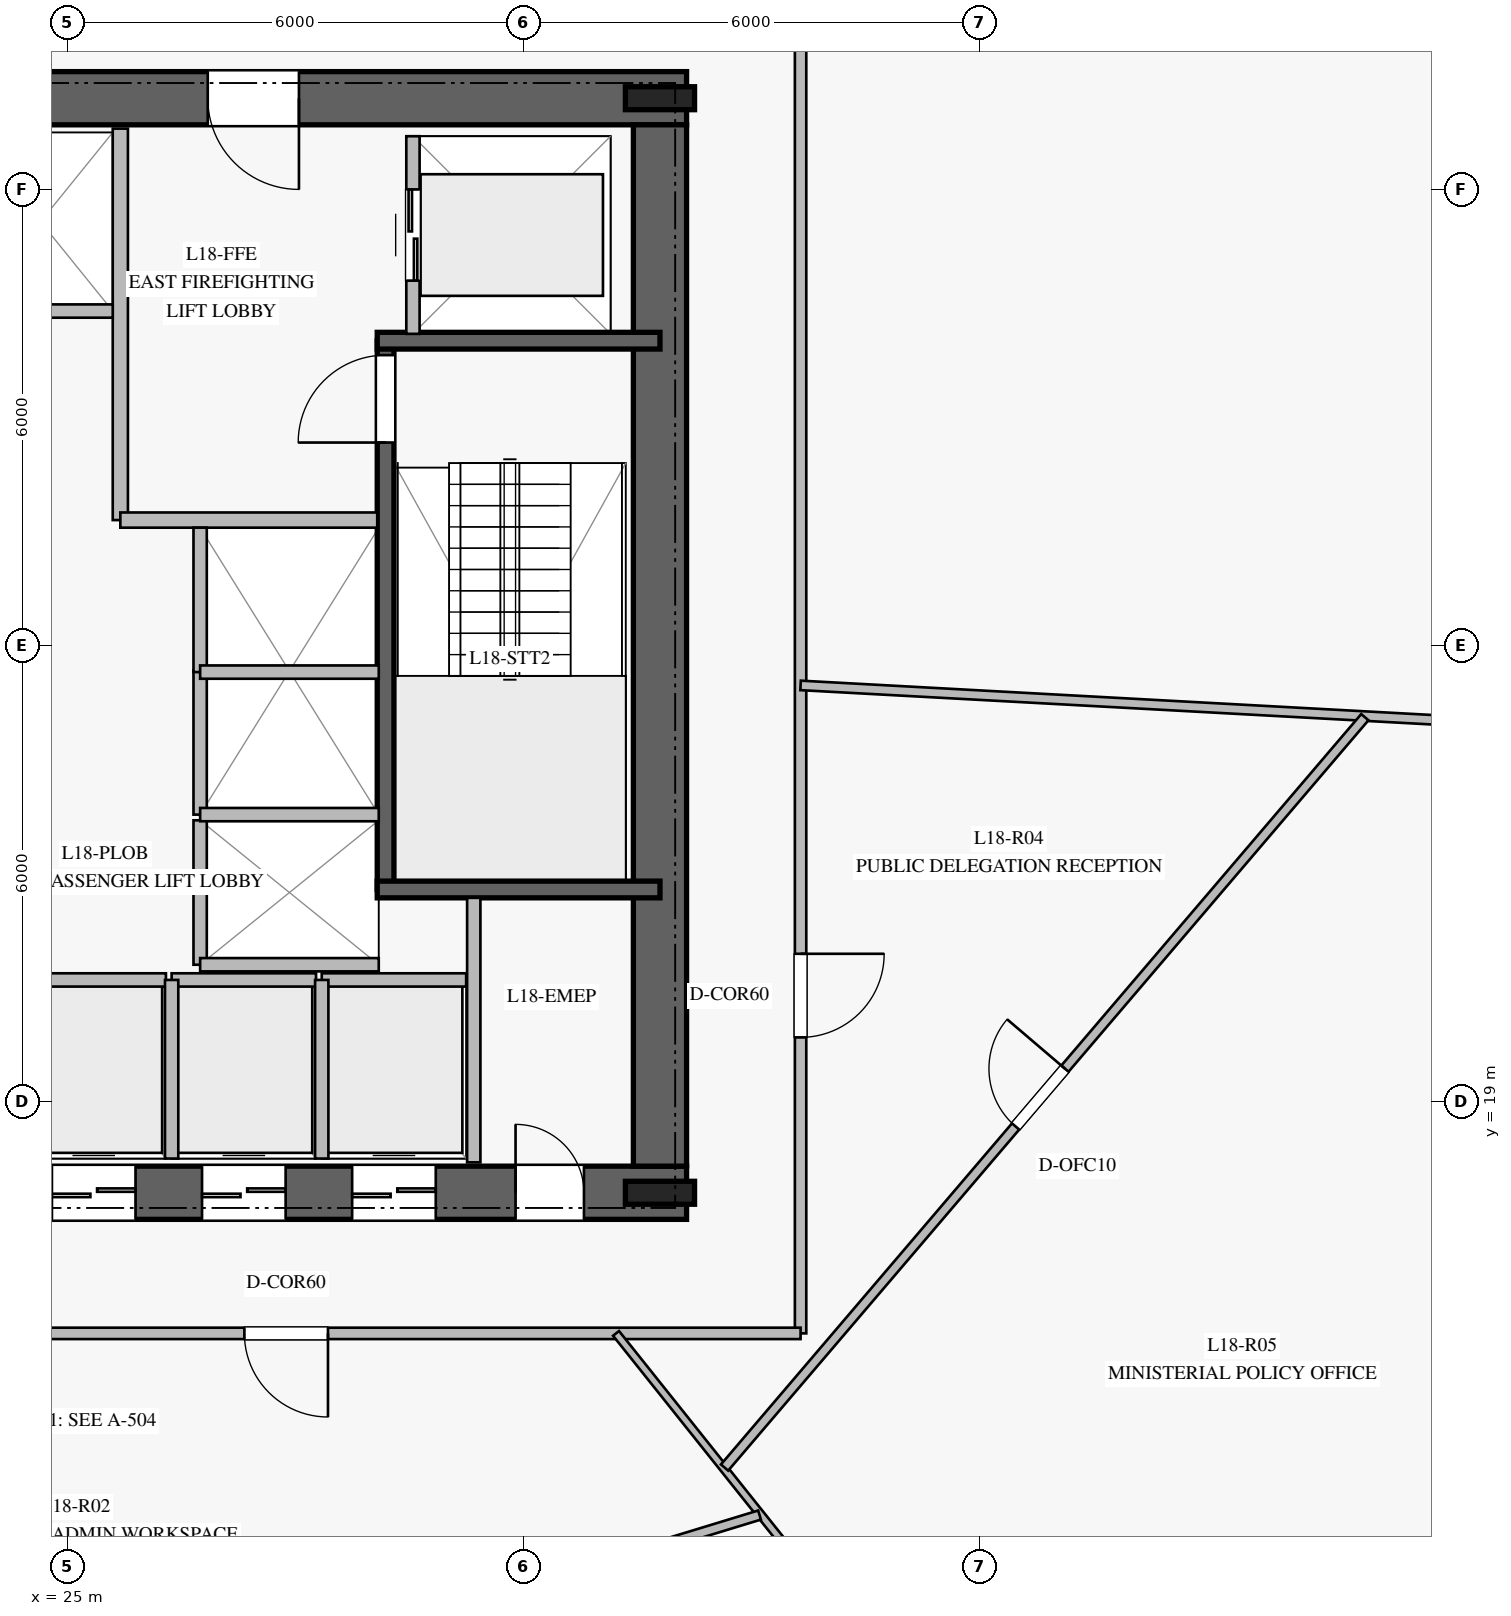
"""IFC4 building model, lengths in metres.
Left out: names, types, materials, properties, quantities, classifications, styles, units other than length and angle.
Written with IfcOpenShell. Run it as: python <this file> out.ifc"""

import sys

from ifc_helpers import new_model, si_unit, direction, frame, frame_2d, origin, origin_2d, place, context, subcontext, project, spatial, rectangle, i_section, extrude, element, fill, save


model = new_model("IFC4")
c1 = context("Model", 3, precision=1e-05, world=origin(), true_north=direction((0.0, 1.0)))
c2 = subcontext(c1, "Body", "Model", "MODEL_VIEW")
j1 = project(units=[si_unit("LENGTHUNIT", "METRE"), si_unit("PLANEANGLEUNIT", "RADIAN")], contexts=[c1])
p1 = place(None, origin())
s1 = spatial("IfcSite", under=j1, at=p1, CompositionType="ELEMENT")
p2 = place(p1, origin())
s2 = spatial("IfcBuilding", under=s1, at=p2, CompositionType="ELEMENT")
p3 = place(p2, frame((0.0, 0.0, 76.0)))
s3 = spatial("IfcBuildingStorey", under=s2, at=p3, CompositionType="ELEMENT", Elevation=76.0)
p4 = place(p3, frame((16.85, 17.8, 0.0), z_axis=(0.0, 0.0, 1.0), x_axis=(1.0, 0.0, 0.0)))
e1 = element("IfcWall", 1, at=p4, inside=s3, PredefinedType="SHEAR", context=c2, shape_type="SweptSolid", body=[
    extrude(rectangle(XDim=16.3, YDim=0.7, at=frame_2d((8.15, 0.0))), origin(), (0.0, 0.0, 1.0), 3.76),
])
p5 = place(p4, frame((5.1, 0.0, 0.0)))
e2 = element("IfcOpeningElement", 2, at=p5, cuts=e1, PredefinedType="OPENING", context=c2, shape_type="SweptSolid", body=[
    extrude(rectangle(XDim=1.2, YDim=2.25, at=frame_2d((0.6, 1.125))), frame((0.0, 0.36, 0.0), z_axis=(0.0, -1.0, 0.0), x_axis=(1.0, 0.0, 0.0)), (0.0, 0.0, 1.0), 0.72),
])
p6 = place(p4, frame((14.05, 0.0, 0.0)))
e3 = element("IfcOpeningElement", 3, at=p6, cuts=e1, PredefinedType="OPENING", context=c2, shape_type="SweptSolid", body=[
    extrude(rectangle(XDim=0.9, YDim=2.1, at=frame_2d((0.45, 1.05))), frame((0.0, 0.36, 0.0), z_axis=(0.0, -1.0, 0.0), x_axis=(1.0, 0.0, 0.0)), (0.0, 0.0, 1.0), 0.72),
])
p7 = place(p4, frame((7.95, 0.0, 0.0)))
e4 = element("IfcOpeningElement", 4, at=p7, cuts=e1, PredefinedType="OPENING", context=c2, shape_type="SweptSolid", body=[
    extrude(rectangle(XDim=1.1, YDim=2.2, at=frame_2d((0.55, 1.1))), frame((0.0, 0.36, 0.0), z_axis=(0.0, -1.0, 0.0), x_axis=(1.0, 0.0, 0.0)), (0.0, 0.0, 1.0), 0.72),
])
p8 = place(p4, frame((9.925, 0.0, 0.0)))
e5 = element("IfcOpeningElement", 5, at=p8, cuts=e1, PredefinedType="OPENING", context=c2, shape_type="SweptSolid", body=[
    extrude(rectangle(XDim=1.1, YDim=2.2, at=frame_2d((0.55, 1.1))), frame((0.0, 0.36, 0.0), z_axis=(0.0, -1.0, 0.0), x_axis=(1.0, 0.0, 0.0)), (0.0, 0.0, 1.0), 0.72),
])
p9 = place(p4, frame((11.9, 0.0, 0.0)))
e6 = element("IfcOpeningElement", 6, at=p9, cuts=e1, PredefinedType="OPENING", context=c2, shape_type="SweptSolid", body=[
    extrude(rectangle(XDim=1.1, YDim=2.2, at=frame_2d((0.55, 1.1))), frame((0.0, 0.36, 0.0), z_axis=(0.0, -1.0, 0.0), x_axis=(1.0, 0.0, 0.0)), (0.0, 0.0, 1.0), 0.72),
])
p10 = place(p3, frame((33.15, 32.2, 0.0), z_axis=(0.0, 0.0, 1.0), x_axis=(-1.0, 0.0, 0.0)))
e7 = element("IfcWall", 7, at=p10, inside=s3, PredefinedType="SHEAR", context=c2, shape_type="SweptSolid", body=[
    extrude(rectangle(XDim=16.3, YDim=0.7, at=frame_2d((8.15, 0.0))), origin(), (0.0, 0.0, 1.0), 3.76),
])
p11 = place(p10, frame((5.1, 0.0, 0.0)))
e8 = element("IfcOpeningElement", 8, at=p11, cuts=e7, PredefinedType="OPENING", context=c2, shape_type="SweptSolid", body=[
    extrude(rectangle(XDim=1.2, YDim=2.25, at=frame_2d((0.6, 1.125))), frame((0.0, 0.36, 0.0), z_axis=(0.0, -1.0, 0.0), x_axis=(1.0, 0.0, 0.0)), (0.0, 0.0, 1.0), 0.72),
])
p12 = place(p3, frame((32.8, 18.15, 0.0), z_axis=(0.0, 0.0, 1.0), x_axis=(0.0, 1.0, 0.0)))
e9 = element("IfcWall", 9, at=p12, inside=s3, PredefinedType="SHEAR", context=c2, shape_type="SweptSolid", body=[
    extrude(rectangle(XDim=13.7, YDim=0.7, at=frame_2d((6.85, 0.0))), origin(), (0.0, 0.0, 1.0), 3.76),
])
for number, where, z_axis, x_axis in (
    (10, (32.8, 17.8, 0.0), (0.0, 0.0, 1.0), (1.0, 0.0, 0.0)),
    (11, (32.8, 32.2, 0.0), (0.0, 0.0, 1.0), (1.0, 0.0, 0.0)),
):
    element("IfcColumn", number, at=place(p3, frame(where, z_axis=z_axis, x_axis=x_axis)), inside=s3, PredefinedType="COLUMN", context=c2, shape_type="SweptSolid", body=[
        extrude(i_section(OverallWidth=0.302, OverallDepth=0.91, WebThickness=0.021, FlangeThickness=0.04, at=origin_2d()), origin(), (0.0, 0.0, 1.0), 4.0),
    ])
p13 = place(p3, frame((29.19, 21.79, 0.0), z_axis=(0.0, 0.0, 1.0), x_axis=(0.0, 1.0, 0.0)))
e12 = element("IfcWall", 12, at=p13, inside=s3, PredefinedType="SOLIDWALL", context=c2, shape_type="SweptSolid", body=[
    extrude(rectangle(XDim=7.22, YDim=0.22, at=frame_2d((3.61, 0.0))), origin(), (0.0, 0.0, 1.0), 3.76),
])
p14 = place(p13, frame((5.88, 0.0, 0.0)))
e13 = element("IfcOpeningElement", 13, at=p14, cuts=e12, PredefinedType="OPENING", context=c2, shape_type="SweptSolid", body=[
    extrude(rectangle(XDim=1.15, YDim=2.2, at=frame_2d((0.575, 1.1))), frame((0.0, 0.12, 0.0), z_axis=(0.0, -1.0, 0.0), x_axis=(1.0, 0.0, 0.0)), (0.0, 0.0, 1.0), 0.24),
])
for number, where, z_axis, x_axis in (
    (14, (29.08, 21.79, 0.0), (0.0, 0.0, 1.0), (1.0, 0.0, 0.0)),
    (15, (29.08, 29.01, 0.0), (0.0, 0.0, 1.0), (1.0, 0.0, 0.0)),
):
    element("IfcWall", number, at=place(p3, frame(where, z_axis=z_axis, x_axis=x_axis)), inside=s3, PredefinedType="SOLIDWALL", context=c2, shape_type="SweptSolid", body=[
        extrude(rectangle(XDim=3.72, YDim=0.22, at=frame_2d((1.86, 0.0))), origin(), (0.0, 0.0, 1.0), 3.76),
    ])
p15 = place(p3, frame((25.7, 26.65, 0.0), z_axis=(0.0, 0.0, 1.0), x_axis=(0.0, 1.0, 0.0)))
e16 = element("IfcWall", 16, at=p15, inside=s3, PredefinedType="PARTITIONING", context=c2, shape_type="SweptSolid", body=[
    extrude(rectangle(XDim=5.15, YDim=0.2, at=frame_2d((2.575, 0.0))), origin(), (0.0, 0.0, 1.0), 3.76),
])
p16 = place(p3, frame((25.7, 26.65, 0.0), z_axis=(0.0, 0.0, 1.0), x_axis=(1.0, 0.0, 0.0)))
e17 = element("IfcWall", 17, at=p16, inside=s3, PredefinedType="PARTITIONING", context=c2, shape_type="SweptSolid", body=[
    extrude(rectangle(XDim=3.38, YDim=0.2, at=frame_2d((1.69, 0.0))), origin(), (0.0, 0.0, 1.0), 3.76),
])
p17 = place(p3, frame((30.35, 18.2, 0.0), z_axis=(0.0, 0.0, 1.0), x_axis=(0.0, 1.0, 0.0)))
e18 = element("IfcWall", 18, at=p17, inside=s3, PredefinedType="PARTITIONING", context=c2, shape_type="SweptSolid", body=[
    extrude(rectangle(XDim=3.48, YDim=0.175, at=frame_2d((1.74, 0.0))), origin(), (0.0, 0.0, 1.0), 3.76),
])
p18 = place(p3, frame((24.4, 20.6, 0.0), z_axis=(0.0, 0.0, 1.0), x_axis=(1.0, 0.0, 0.0)))
e19 = element("IfcWall", 19, at=p18, inside=s3, PredefinedType="PARTITIONING", context=c2, shape_type="SweptSolid", body=[
    extrude(rectangle(XDim=1.9, YDim=0.175, at=frame_2d((0.95, 0.0))), origin(), (0.0, 0.0, 1.0), 3.76),
])
p19 = place(p3, frame((26.375, 20.6, 0.0), z_axis=(0.0, 0.0, 1.0), x_axis=(1.0, 0.0, 0.0)))
e20 = element("IfcWall", 20, at=p19, inside=s3, PredefinedType="PARTITIONING", context=c2, shape_type="SweptSolid", body=[
    extrude(rectangle(XDim=1.9, YDim=0.175, at=frame_2d((0.95, 0.0))), origin(), (0.0, 0.0, 1.0), 3.76),
])
p20 = place(p3, frame((26.375, 18.25, 0.0), z_axis=(0.0, 0.0, 1.0), x_axis=(0.0, 1.0, 0.0)))
e21 = element("IfcWall", 21, at=p20, inside=s3, PredefinedType="PARTITIONING", context=c2, shape_type="SweptSolid", body=[
    extrude(rectangle(XDim=2.35, YDim=0.175, at=frame_2d((1.175, 0.0))), origin(), (0.0, 0.0, 1.0), 3.76),
])
p21 = place(p3, frame((28.35, 20.6, 0.0), z_axis=(0.0, 0.0, 1.0), x_axis=(1.0, 0.0, 0.0)))
e22 = element("IfcWall", 22, at=p21, inside=s3, PredefinedType="PARTITIONING", context=c2, shape_type="SweptSolid", body=[
    extrude(rectangle(XDim=1.9, YDim=0.175, at=frame_2d((0.95, 0.0))), origin(), (0.0, 0.0, 1.0), 3.76),
])
p22 = place(p3, frame((28.35, 18.25, 0.0), z_axis=(0.0, 0.0, 1.0), x_axis=(0.0, 1.0, 0.0)))
e23 = element("IfcWall", 23, at=p22, inside=s3, PredefinedType="PARTITIONING", context=c2, shape_type="SweptSolid", body=[
    extrude(rectangle(XDim=2.35, YDim=0.175, at=frame_2d((1.175, 0.0))), origin(), (0.0, 0.0, 1.0), 3.76),
])
p23 = place(p3, frame((23.7, 29.4, 0.0), z_axis=(0.0, 0.0, 1.0), x_axis=(1.0, 0.0, 0.0)))
e24 = element("IfcWall", 24, at=p23, inside=s3, PredefinedType="PARTITIONING", context=c2, shape_type="SweptSolid", body=[
    extrude(rectangle(XDim=1.9, YDim=0.175, at=frame_2d((0.95, 0.0))), origin(), (0.0, 0.0, 1.0), 3.76),
])
p24 = place(p3, frame((26.75, 20.8, 0.0), z_axis=(0.0, 0.0, 1.0), x_axis=(0.0, 1.0, 0.0)))
e25 = element("IfcWall", 25, at=p24, inside=s3, PredefinedType="PARTITIONING", context=c2, shape_type="SweptSolid", body=[
    extrude(rectangle(XDim=1.9, YDim=0.175, at=frame_2d((0.95, 0.0))), origin(), (0.0, 0.0, 1.0), 3.76),
])
p25 = place(p3, frame((26.75, 20.8, 0.0), z_axis=(0.0, 0.0, 1.0), x_axis=(1.0, 0.0, 0.0)))
e26 = element("IfcWall", 26, at=p25, inside=s3, PredefinedType="PARTITIONING", context=c2, shape_type="SweptSolid", body=[
    extrude(rectangle(XDim=2.35, YDim=0.175, at=frame_2d((1.175, 0.0))), origin(), (0.0, 0.0, 1.0), 3.76),
])
p26 = place(p3, frame((26.75, 22.775, 0.0), z_axis=(0.0, 0.0, 1.0), x_axis=(0.0, 1.0, 0.0)))
e27 = element("IfcWall", 27, at=p26, inside=s3, PredefinedType="PARTITIONING", context=c2, shape_type="SweptSolid", body=[
    extrude(rectangle(XDim=1.9, YDim=0.175, at=frame_2d((0.95, 0.0))), origin(), (0.0, 0.0, 1.0), 3.76),
])
p27 = place(p3, frame((26.75, 22.775, 0.0), z_axis=(0.0, 0.0, 1.0), x_axis=(1.0, 0.0, 0.0)))
e28 = element("IfcWall", 28, at=p27, inside=s3, PredefinedType="PARTITIONING", context=c2, shape_type="SweptSolid", body=[
    extrude(rectangle(XDim=2.35, YDim=0.175, at=frame_2d((1.175, 0.0))), origin(), (0.0, 0.0, 1.0), 3.76),
])
p28 = place(p3, frame((26.75, 24.65, 0.0), z_axis=(0.0, 0.0, 1.0), x_axis=(0.0, 1.0, 0.0)))
e29 = element("IfcWall", 29, at=p28, inside=s3, PredefinedType="PARTITIONING", context=c2, shape_type="SweptSolid", body=[
    extrude(rectangle(XDim=1.9, YDim=0.175, at=frame_2d((0.95, 0.0))), origin(), (0.0, 0.0, 1.0), 3.76),
])
p29 = place(p3, frame((26.75, 24.65, 0.0), z_axis=(0.0, 0.0, 1.0), x_axis=(1.0, 0.0, 0.0)))
e30 = element("IfcWall", 30, at=p29, inside=s3, PredefinedType="PARTITIONING", context=c2, shape_type="SweptSolid", body=[
    extrude(rectangle(XDim=2.35, YDim=0.175, at=frame_2d((1.175, 0.0))), origin(), (0.0, 0.0, 1.0), 3.76),
])
p30 = place(p3, frame((29.55, 29.1, 0.0), z_axis=(0.0, 0.0, 1.0), x_axis=(0.0, 1.0, 0.0)))
e31 = element("IfcWall", 31, at=p30, inside=s3, PredefinedType="PARTITIONING", context=c2, shape_type="SweptSolid", body=[
    extrude(rectangle(XDim=2.6, YDim=0.175, at=frame_2d((1.3, 0.0))), origin(), (0.0, 0.0, 1.0), 3.76),
])
p31 = place(p30, frame((0.7, 0.0, 0.0)))
e32 = element("IfcOpeningElement", 32, at=p31, cuts=e31, PredefinedType="OPENING", context=c2, shape_type="SweptSolid", body=[
    extrude(rectangle(XDim=1.2, YDim=2.2, at=frame_2d((0.6, 1.1))), frame((0.0, 0.098, 0.0), z_axis=(0.0, -1.0, 0.0), x_axis=(1.0, 0.0, 0.0)), (0.0, 0.0, 1.0), 0.195),
])
p32 = place(p3, frame((34.65, 34.05, 0.0), z_axis=(0.0, 0.0, 1.0), x_axis=(0.0, -1.0, 0.0)))
e33 = element("IfcWall", 33, at=p32, inside=s3, PredefinedType="PARTITIONING", context=c2, shape_type="SweptSolid", body=[
    extrude(rectangle(XDim=18.1, YDim=0.15, at=frame_2d((9.05, 0.0))), origin(), (0.0, 0.0, 1.0), 3.21),
])
p33 = place(p32, frame((13.106, 0.0, 0.0)))
e34 = element("IfcOpeningElement", 34, at=p33, cuts=e33, PredefinedType="OPENING", context=c2, shape_type="SweptSolid", body=[
    extrude(rectangle(XDim=1.1, YDim=2.2, at=frame_2d((0.55, 1.1))), frame((0.0, 0.085, 0.0), z_axis=(0.0, -1.0, 0.0), x_axis=(1.0, 0.0, 0.0)), (0.0, 0.0, 1.0), 0.17),
])
p34 = place(p3, frame((34.65, 15.95, 0.0), z_axis=(0.0, 0.0, 1.0), x_axis=(-1.0, 0.0, 0.0)))
e35 = element("IfcWall", 35, at=p34, inside=s3, PredefinedType="PARTITIONING", context=c2, shape_type="SweptSolid", body=[
    extrude(rectangle(XDim=19.3, YDim=0.15, at=frame_2d((9.65, 0.0))), origin(), (0.0, 0.0, 1.0), 3.21),
])
p35 = place(p34, frame((14.506, 0.0, 0.0)))
e36 = element("IfcOpeningElement", 36, at=p35, cuts=e35, PredefinedType="OPENING", context=c2, shape_type="SweptSolid", body=[
    extrude(rectangle(XDim=1.1, YDim=2.2, at=frame_2d((0.55, 1.1))), frame((0.0, 0.085, 0.0), z_axis=(0.0, -1.0, 0.0), x_axis=(1.0, 0.0, 0.0)), (0.0, 0.0, 1.0), 0.17),
])
p36 = place(p34, frame((6.218, 0.0, 0.0)))
e37 = element("IfcOpeningElement", 37, at=p36, cuts=e35, PredefinedType="OPENING", context=c2, shape_type="SweptSolid", body=[
    extrude(rectangle(XDim=1.1, YDim=2.2, at=frame_2d((0.55, 1.1))), frame((0.0, 0.085, 0.0), z_axis=(0.0, -1.0, 0.0), x_axis=(1.0, 0.0, 0.0)), (0.0, 0.0, 1.0), 0.17),
])
p37 = place(p3, frame((32.222, 15.95, 0.0), z_axis=(0.0, 0.0, 1.0), x_axis=(0.623766515339, -0.781610730698, 0.0)))
e38 = element("IfcWall", 38, at=p37, inside=s3, PredefinedType="MOVABLE", context=c2, shape_type="SweptSolid", body=[
    extrude(rectangle(XDim=12.126, YDim=0.1, at=frame_2d((6.063, 0.0))), origin(), (0.0, 0.0, 1.0), 3.06),
])
p38 = place(p3, frame((34.65, 24.475, 0.0), z_axis=(0.0, 0.0, 1.0), x_axis=(0.998524363599, -0.054305573375, 0.0)))
e39 = element("IfcWall", 39, at=p38, inside=s3, PredefinedType="PARTITIONING", context=c2, shape_type="SweptSolid", body=[
    extrude(rectangle(XDim=12.448, YDim=0.125, at=frame_2d((6.224, 0.0))), origin(), (0.0, 0.0, 1.0), 3.06),
])
p39 = place(p3, frame((22.197, 9.927, 0.0), z_axis=(0.0, 0.0, 1.0), x_axis=(0.956509687219, 0.291700562659, 0.0)))
e40 = element("IfcWall", 40, at=p39, inside=s3, PredefinedType="PARTITIONING", context=c2, shape_type="SweptSolid", body=[
    extrude(rectangle(XDim=12.455, YDim=0.125, at=frame_2d((6.228, 0.0))), origin(), (0.0, 0.0, 1.0), 3.21),
])
p40 = place(p39, frame((5.727, 0.0, 0.0)))
e41 = element("IfcOpeningElement", 41, at=p40, cuts=e40, PredefinedType="OPENING", context=c2, shape_type="SweptSolid", body=[
    extrude(rectangle(XDim=1.0, YDim=2.15, at=frame_2d((0.5, 1.075))), frame((0.0, 0.073, 0.0), z_axis=(0.0, -1.0, 0.0), x_axis=(1.0, 0.0, 0.0)), (0.0, 0.0, 1.0), 0.145),
])
p41 = place(p3, frame((33.65, 14.185, 0.0), z_axis=(0.0, 0.0, 1.0), x_axis=(0.649124350688, 0.760682310392, 0.0)))
e42 = element("IfcWall", 42, at=p41, inside=s3, PredefinedType="PARTITIONING", context=c2, shape_type="SweptSolid", body=[
    extrude(rectangle(XDim=12.978, YDim=0.125, at=frame_2d((6.489, 0.0))), origin(), (0.0, 0.0, 1.0), 3.21),
])
p42 = place(p41, frame((5.899, 0.0, 0.0)))
e43 = element("IfcOpeningElement", 43, at=p42, cuts=e42, PredefinedType="OPENING", context=c2, shape_type="SweptSolid", body=[
    extrude(rectangle(XDim=1.0, YDim=2.15, at=frame_2d((0.5, 1.075))), frame((0.0, 0.073, 0.0), z_axis=(0.0, -1.0, 0.0), x_axis=(1.0, 0.0, 0.0)), (0.0, 0.0, 1.0), 0.145),
])
p43 = place(p14, origin())
e44 = element("IfcDoor", 44, at=p43, inside=s3, OperationType="SINGLE_SWING_LEFT", PredefinedType="DOOR", context=c2, shape_type="SweptSolid", body=[
    extrude(rectangle(XDim=1.15, YDim=2.2, at=frame_2d((0.575, 1.1))), frame((0.0, 0.025, 0.0), z_axis=(0.0, -1.0, 0.0), x_axis=(1.0, 0.0, 0.0)), (0.0, 0.0, 1.0), 0.05),
])
fill(e13, e44)
p44 = place(p11, origin())
e45 = element("IfcDoor", 45, at=p44, inside=s3, OperationType="SINGLE_SWING_LEFT", PredefinedType="DOOR", context=c2, shape_type="SweptSolid", body=[
    extrude(rectangle(XDim=1.2, YDim=2.25, at=frame_2d((0.6, 1.125))), frame((0.0, 0.025, 0.0), z_axis=(0.0, -1.0, 0.0), x_axis=(1.0, 0.0, 0.0)), (0.0, 0.0, 1.0), 0.05),
])
fill(e8, e45)
p45 = place(p6, origin())
e46 = element("IfcDoor", 46, at=p45, inside=s3, OperationType="SINGLE_SWING_LEFT", PredefinedType="DOOR", context=c2, shape_type="SweptSolid", body=[
    extrude(rectangle(XDim=0.9, YDim=2.1, at=frame_2d((0.45, 1.05))), frame((0.0, 0.025, 0.0), z_axis=(0.0, -1.0, 0.0), x_axis=(1.0, 0.0, 0.0)), (0.0, 0.0, 1.0), 0.05),
])
fill(e3, e46)
p46 = place(p7, origin())
e47 = element("IfcDoor", 47, at=p46, inside=s3, OperationType="DOUBLE_DOOR_SLIDING", PredefinedType="DOOR", context=c2, shape_type="SweptSolid", body=[
    extrude(rectangle(XDim=1.1, YDim=2.2, at=frame_2d((0.55, 1.1))), frame((0.0, 0.025, 0.0), z_axis=(0.0, -1.0, 0.0), x_axis=(1.0, 0.0, 0.0)), (0.0, 0.0, 1.0), 0.05),
])
fill(e4, e47)
p47 = place(p8, origin())
e48 = element("IfcDoor", 48, at=p47, inside=s3, OperationType="DOUBLE_DOOR_SLIDING", PredefinedType="DOOR", context=c2, shape_type="SweptSolid", body=[
    extrude(rectangle(XDim=1.1, YDim=2.2, at=frame_2d((0.55, 1.1))), frame((0.0, 0.025, 0.0), z_axis=(0.0, -1.0, 0.0), x_axis=(1.0, 0.0, 0.0)), (0.0, 0.0, 1.0), 0.05),
])
fill(e5, e48)
p48 = place(p9, origin())
e49 = element("IfcDoor", 49, at=p48, inside=s3, OperationType="DOUBLE_DOOR_SLIDING", PredefinedType="DOOR", context=c2, shape_type="SweptSolid", body=[
    extrude(rectangle(XDim=1.1, YDim=2.2, at=frame_2d((0.55, 1.1))), frame((0.0, 0.025, 0.0), z_axis=(0.0, -1.0, 0.0), x_axis=(1.0, 0.0, 0.0)), (0.0, 0.0, 1.0), 0.05),
])
fill(e6, e49)
p49 = place(p31, origin())
e50 = element("IfcDoor", 50, at=p49, inside=s3, OperationType="DOUBLE_DOOR_SLIDING", PredefinedType="DOOR", context=c2, shape_type="SweptSolid", body=[
    extrude(rectangle(XDim=1.2, YDim=2.2, at=frame_2d((0.6, 1.1))), frame((0.0, 0.025, 0.0), z_axis=(0.0, -1.0, 0.0), x_axis=(1.0, 0.0, 0.0)), (0.0, 0.0, 1.0), 0.05),
])
fill(e32, e50)
p50 = place(p36, origin())
e51 = element("IfcDoor", 51, at=p50, inside=s3, OperationType="SINGLE_SWING_LEFT", PredefinedType="DOOR", context=c2, shape_type="SweptSolid", body=[
    extrude(rectangle(XDim=1.1, YDim=2.2, at=frame_2d((0.55, 1.1))), frame((0.0, 0.025, 0.0), z_axis=(0.0, -1.0, 0.0), x_axis=(1.0, 0.0, 0.0)), (0.0, 0.0, 1.0), 0.05),
])
fill(e37, e51)
p51 = place(p33, origin())
e52 = element("IfcDoor", 52, at=p51, inside=s3, OperationType="SINGLE_SWING_LEFT", PredefinedType="DOOR", context=c2, shape_type="SweptSolid", body=[
    extrude(rectangle(XDim=1.1, YDim=2.2, at=frame_2d((0.55, 1.1))), frame((0.0, 0.025, 0.0), z_axis=(0.0, -1.0, 0.0), x_axis=(1.0, 0.0, 0.0)), (0.0, 0.0, 1.0), 0.05),
])
fill(e34, e52)
p52 = place(p42, origin())
e53 = element("IfcDoor", 53, at=p52, inside=s3, OperationType="SINGLE_SWING_RIGHT", PredefinedType="DOOR", context=c2, shape_type="SweptSolid", body=[
    extrude(rectangle(XDim=1.0, YDim=2.15, at=frame_2d((0.5, 1.075))), frame((0.0, 0.025, 0.0), z_axis=(0.0, -1.0, 0.0), x_axis=(1.0, 0.0, 0.0)), (0.0, 0.0, 1.0), 0.05),
])
fill(e43, e53)
save(model, sys.argv[1])
